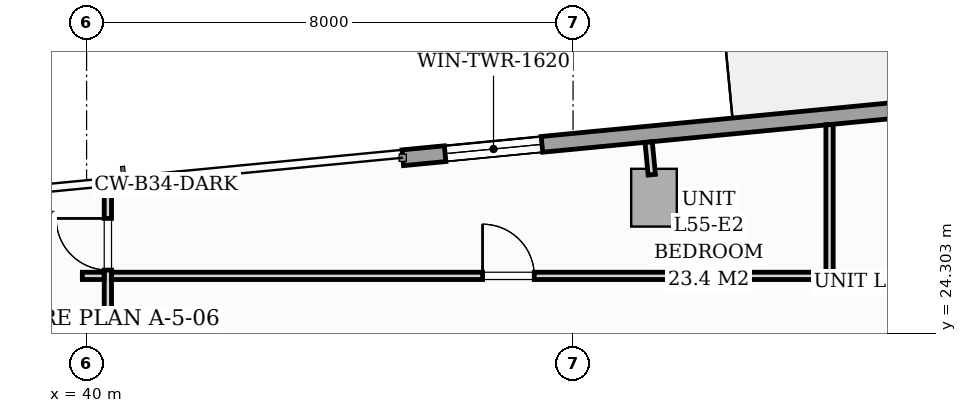
"""IFC4 building model, lengths in metres.
Left out: names, types, materials, properties, quantities, classifications, styles, units other than length and angle.
Written with IfcOpenShell. Run it as: python <this file> out.ifc"""

import sys

from ifc_helpers import new_model, si_unit, direction, frame, frame_2d, origin, origin_2d, place, context, subcontext, project, spatial, rectangle, extrude, source, transform, mapped, element, fill, save


model = new_model("IFC4")
c1 = context("Model", 3, precision=1e-05, world=origin(), true_north=direction((0.0, 1.0)))
c2 = subcontext(c1, "Body", "Model", "MODEL_VIEW")
j1 = project(units=[si_unit("LENGTHUNIT", "METRE"), si_unit("PLANEANGLEUNIT", "RADIAN")], contexts=[c1])
p1 = place(None, origin())
s1 = spatial("IfcSite", under=j1, at=p1, CompositionType="ELEMENT")
p2 = place(p1, origin())
s2 = spatial("IfcBuilding", under=s1, at=p2, CompositionType="ELEMENT")
p3 = place(p2, frame((0.0, 0.0, 192.2)))
s3 = spatial("IfcBuildingStorey", under=s2, at=p3, CompositionType="ELEMENT", Elevation=192.2)
m1 = source(origin(), c2, "Body", "SweptSolid", [
    extrude(rectangle(XDim=0.75, YDim=0.95, at=origin_2d()), origin(), (0.0, 0.0, 1.0), 3.196),
])
p4 = place(p3, frame((49.331, 26.533, 0.002), z_axis=(0.0, 0.0, 1.0), x_axis=(0.995396198367, 0.09584575252, 0.0)))
e1 = element("IfcColumn", 1, at=p4, inside=s3, PredefinedType="COLUMN", context=c2, shape_type="MappedRepresentation", body=[
    mapped(m1, transform((0.0, 0.0, 0.0), scale=1.0)),
])
p5 = place(p3, frame((45.199, 27.19, 0.0), z_axis=(0.0, 0.0, 1.0), x_axis=(0.995397074604, 0.095836652014, 0.0)))
e2 = element("IfcWall", 2, at=p5, inside=s3, PredefinedType="STANDARD", context=c2, shape_type="SweptSolid", body=[
    extrude(rectangle(XDim=16.1, YDim=0.26, at=frame_2d((8.05, 0.0))), origin(), (0.0, 0.0, 1.0), 2.94),
])
p6 = place(p5, frame((8.74, 0.0, 0.0)))
e3 = element("IfcOpeningElement", 3, at=p6, cuts=e2, PredefinedType="OPENING", context=c2, shape_type="SweptSolid", body=[
    extrude(rectangle(XDim=1.8, YDim=2.06, at=frame_2d((0.9, 1.03))), frame((0.0, 0.14, 0.0), z_axis=(0.0, -1.0, 0.0), x_axis=(1.0, 0.0, 0.0)), (0.0, 0.0, 1.0), 0.28),
])
p7 = place(p5, frame((0.7, 0.0, 0.65)))
e4 = element("IfcOpeningElement", 4, at=p7, cuts=e2, PredefinedType="OPENING", context=c2, shape_type="SweptSolid", body=[
    extrude(rectangle(XDim=1.6, YDim=1.5, at=frame_2d((0.8, 0.75))), frame((0.0, 0.14, 0.0), z_axis=(0.0, -1.0, 0.0), x_axis=(1.0, 0.0, 0.0)), (0.0, 0.0, 1.0), 0.28),
])
p8 = place(p3, frame((40.35, 24.202, 0.0), z_axis=(0.0, 0.0, 1.0), x_axis=(0.0, 1.0, 0.0)))
e5 = element("IfcWall", 5, at=p8, inside=s3, PredefinedType="PARTITIONING", context=c2, shape_type="SweptSolid", body=[
    extrude(rectangle(XDim=2.571, YDim=0.12, at=frame_2d((1.286, 0.0))), origin(), (0.0, 0.0, 1.0), 2.94),
])
p9 = place(p8, frame((1.14, 0.0, 0.0)))
e6 = element("IfcOpeningElement", 6, at=p9, cuts=e5, PredefinedType="OPENING", context=c2, shape_type="SweptSolid", body=[
    extrude(rectangle(XDim=0.85, YDim=2.05, at=frame_2d((0.425, 1.025))), frame((0.0, 0.07, 0.0), z_axis=(0.0, -1.0, 0.0), x_axis=(1.0, 0.0, 0.0)), (0.0, 0.0, 1.0), 0.14),
])
p10 = place(p3, frame((52.218, 25.247, 0.0), z_axis=(0.0, 0.0, 1.0), x_axis=(0.0, 1.0, 0.0)))
e7 = element("IfcWall", 7, at=p10, inside=s3, PredefinedType="PARTITIONING", context=c2, shape_type="SweptSolid", body=[
    extrude(rectangle(XDim=2.486, YDim=0.12, at=frame_2d((1.243, 0.0))), origin(), (0.0, 0.0, 1.0), 2.94),
])
p11 = place(p3, frame((39.93, 25.247, 0.0), z_axis=(0.0, 0.0, 1.0), x_axis=(1.0, 0.0, 0.0)))
e8 = element("IfcWall", 8, at=p11, inside=s3, PredefinedType="PARTITIONING", context=c2, shape_type="SweptSolid", body=[
    extrude(rectangle(XDim=0.358, YDim=0.12, at=frame_2d((0.179, 0.0))), origin(), (0.0, 0.0, 1.0), 2.94),
])
p12 = place(p3, frame((40.412, 25.247, 0.0), z_axis=(0.0, 0.0, 1.0), x_axis=(1.0, 0.0, 0.0)))
e9 = element("IfcWall", 9, at=p12, inside=s3, PredefinedType="PARTITIONING", context=c2, shape_type="SweptSolid", body=[
    extrude(rectangle(XDim=11.744, YDim=0.12, at=frame_2d((5.872, 0.0))), origin(), (0.0, 0.0, 1.0), 2.94),
])
p13 = place(p12, frame((6.1, 0.0, 0.0)))
e10 = element("IfcOpeningElement", 10, at=p13, cuts=e9, PredefinedType="OPENING", context=c2, shape_type="SweptSolid", body=[
    extrude(rectangle(XDim=0.85, YDim=2.05, at=frame_2d((0.425, 1.025))), frame((0.0, 0.07, 0.0), z_axis=(0.0, -1.0, 0.0), x_axis=(1.0, 0.0, 0.0)), (0.0, 0.0, 1.0), 0.14),
])
p14 = place(p3, frame((52.28, 25.247, 0.0), z_axis=(0.0, 0.0, 1.0), x_axis=(1.0, 0.0, 0.0)))
e11 = element("IfcWall", 11, at=p14, inside=s3, PredefinedType="PARTITIONING", context=c2, shape_type="SweptSolid", body=[
    extrude(rectangle(XDim=11.712, YDim=0.12, at=frame_2d((5.856, 0.0))), origin(), (0.0, 0.0, 1.0), 2.94),
])
p15 = place(p14, frame((5.247, 0.0, 0.0)))
e12 = element("IfcOpeningElement", 12, at=p15, cuts=e11, PredefinedType="OPENING", context=c2, shape_type="SweptSolid", body=[
    extrude(rectangle(XDim=0.85, YDim=2.05, at=frame_2d((0.425, 1.025))), frame((0.0, 0.07, 0.0), z_axis=(0.0, -1.0, 0.0), x_axis=(1.0, 0.0, 0.0)), (0.0, 0.0, 1.0), 0.14),
])
p16 = place(p3, frame((49.294, 26.911, 0.0), z_axis=(0.0, 0.0, 1.0), x_axis=(-0.095772948675, 0.995403205893, 0.0)))
e13 = element("IfcWall", 13, at=p16, inside=s3, PredefinedType="PARTITIONING", context=c2, shape_type="SweptSolid", body=[
    extrude(rectangle(XDim=0.538, YDim=0.12, at=frame_2d((0.269, 0.0))), origin(), (0.0, 0.0, 1.0), 2.94),
])
m2 = source(origin(), c2, "Body", "SweptSolid", [
    extrude(rectangle(XDim=1.6, YDim=1.5, at=frame_2d((0.8, 0.75))), frame((0.0, 0.03, 0.0), z_axis=(0.0, -1.0, 0.0), x_axis=(1.0, 0.0, 0.0)), (0.0, 0.0, 1.0), 0.06),
])
p17 = place(p7, origin())
e14 = element("IfcWindow", 14, at=p17, inside=s3, PartitioningType="SINGLE_PANEL", PredefinedType="WINDOW", context=c2, shape_type="MappedRepresentation", body=[
    mapped(m2, transform((0.0, 0.0, 0.0), scale=1.0)),
])
fill(e4, e14)
m3 = source(origin(), c2, "Body", "SweptSolid", [
    extrude(rectangle(XDim=0.85, YDim=2.05, at=frame_2d((0.425, 1.025))), frame((0.0, 0.025, 0.0), z_axis=(0.0, -1.0, 0.0), x_axis=(1.0, 0.0, 0.0)), (0.0, 0.0, 1.0), 0.05),
])
p18 = place(p9, origin())
e15 = element("IfcDoor", 15, at=p18, inside=s3, OperationType="SINGLE_SWING_RIGHT", PredefinedType="DOOR", context=c2, shape_type="MappedRepresentation", body=[
    mapped(m3, transform((0.0, 0.0, 0.0), scale=1.0)),
])
fill(e6, e15)
p19 = place(p13, origin())
e16 = element("IfcDoor", 16, at=p19, inside=s3, OperationType="SINGLE_SWING_LEFT", PredefinedType="DOOR", context=c2, shape_type="MappedRepresentation", body=[
    mapped(m3, transform((0.0, 0.0, 0.0), scale=1.0)),
])
fill(e10, e16)
save(model, sys.argv[1])
